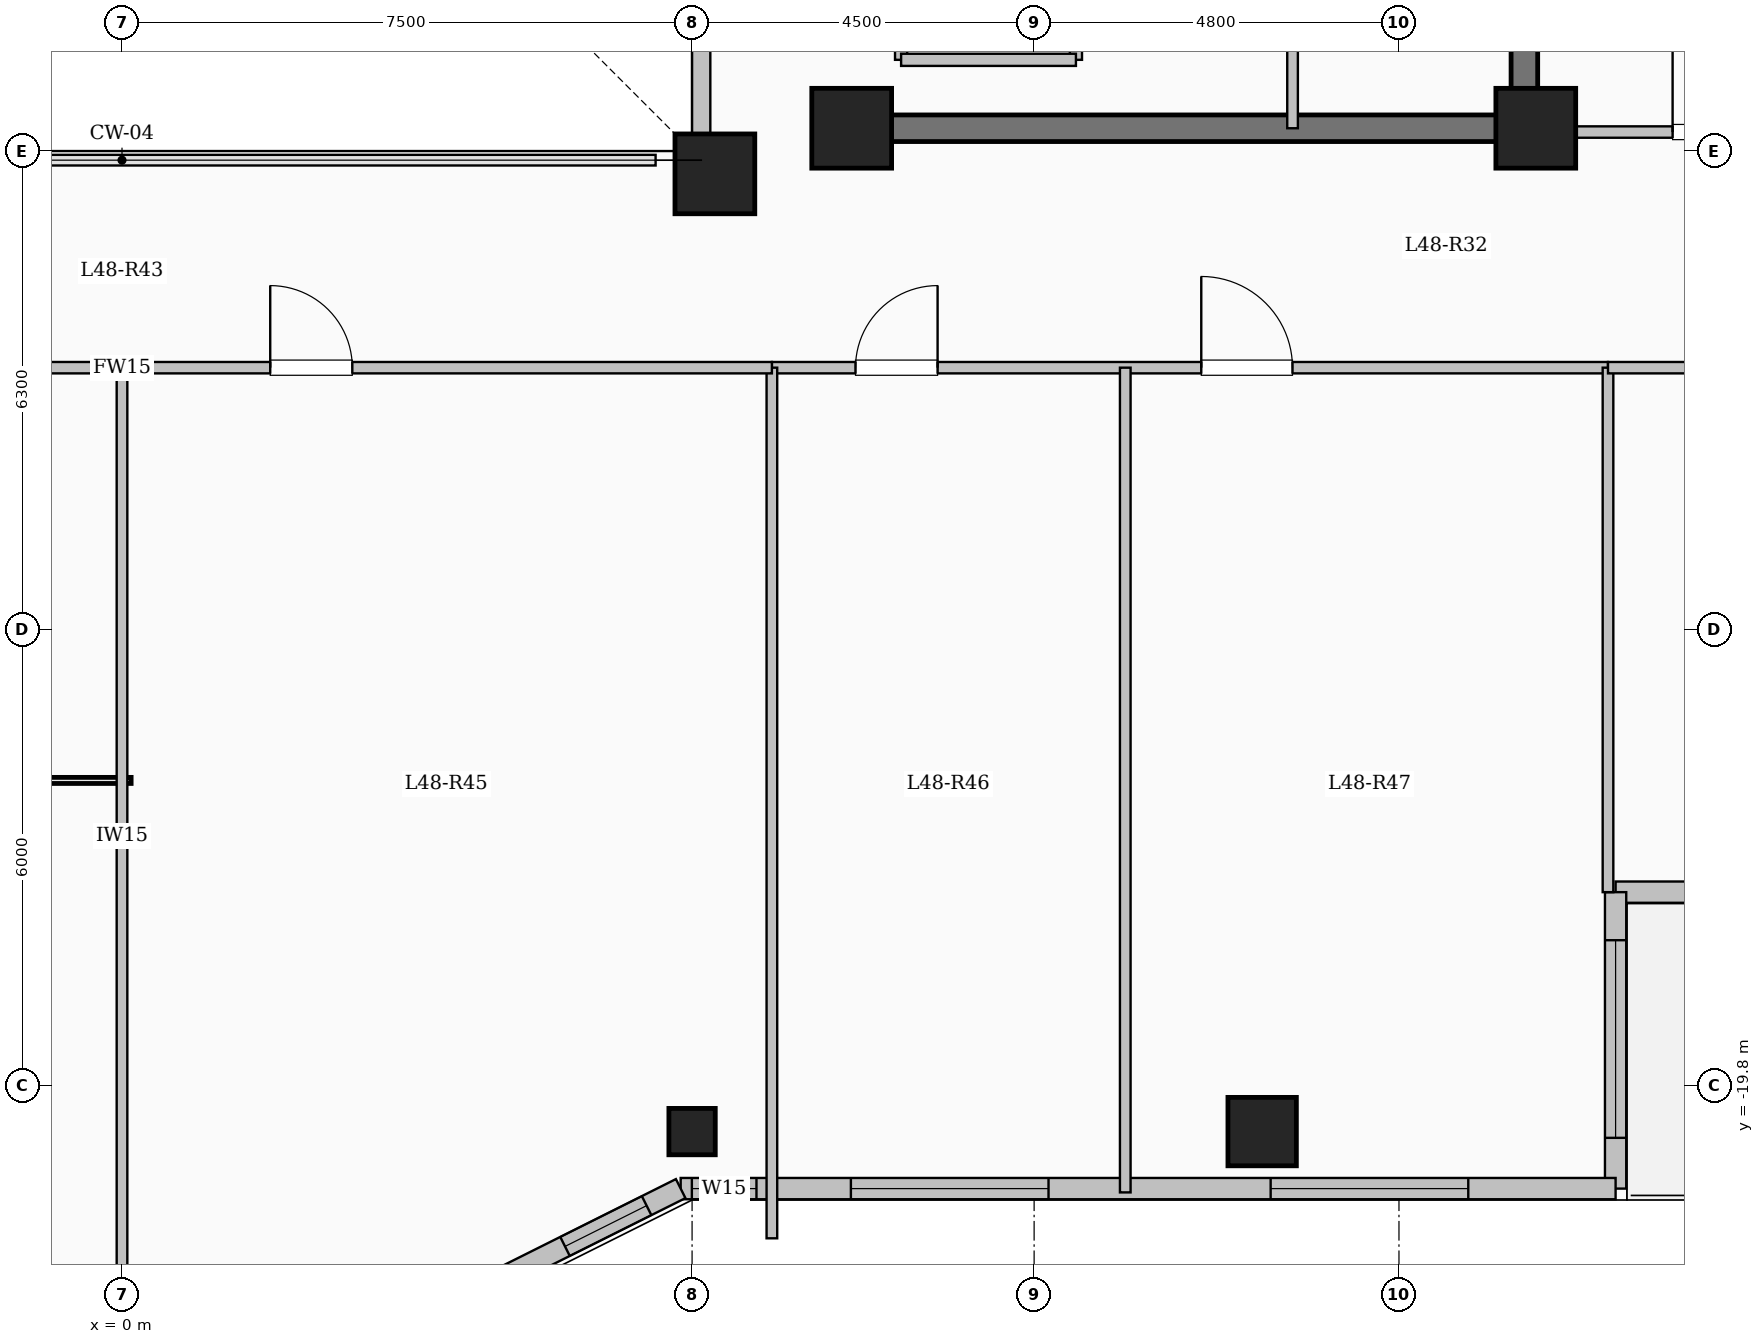
"""IFC4 building model, lengths in metres.
Left out: names, types, materials, properties, quantities, classifications, styles, units other than length and angle.
Written with IfcOpenShell. Run it as: python <this file> out.ifc"""

import sys

from ifc_helpers import new_model, si_unit, direction, frame, frame_2d, origin, origin_2d, place, context, subcontext, project, spatial, rectangle, hollow_circle, extrude, element, fill, save


model = new_model("IFC4")
c1 = context("Model", 3, precision=1e-05, world=origin(), true_north=direction((0.0, 1.0)))
c2 = subcontext(c1, "Body", "Model", "MODEL_VIEW")
j1 = project(units=[si_unit("LENGTHUNIT", "METRE"), si_unit("PLANEANGLEUNIT", "RADIAN")], contexts=[c1])
p1 = place(None, origin())
s1 = spatial("IfcSite", under=j1, at=p1, CompositionType="ELEMENT")
p2 = place(p1, origin())
s2 = spatial("IfcBuilding", under=s1, at=p2, CompositionType="ELEMENT")
p3 = place(p2, frame((0.0, 0.0, 177.3)))
s3 = spatial("IfcBuildingStorey", under=s2, at=p3, CompositionType="ELEMENT", Elevation=177.3)
for number, where, z_axis, x_axis in (
    (1, (7.8, -7.8, 0.0), (0.0, 0.0, 1.0), (1.0, 0.0, 0.0)),
    (2, (9.6, -7.2, 0.0), (0.0, 0.0, 1.0), (1.0, 0.0, 0.0)),
    (3, (18.6, -7.2, 0.0), (0.0, 0.0, 1.0), (1.0, 0.0, 0.0)),
):
    element("IfcColumn", number, at=place(p3, frame(where, z_axis=z_axis, x_axis=x_axis)), inside=s3, PredefinedType="COLUMN", context=c2, shape_type="SweptSolid", body=[
        extrude(rectangle(XDim=1.05, YDim=1.05, at=origin_2d()), origin(), (0.0, 0.0, 1.0), 4.5),
    ])
p4 = place(p3, frame((7.5, -20.4, 0.0), z_axis=(0.0, 0.0, 1.0), x_axis=(1.0, 0.0, 0.0)))
e4 = element("IfcColumn", 4, at=p4, inside=s3, PredefinedType="COLUMN", context=c2, shape_type="SweptSolid", body=[
    extrude(hollow_circle(Radius=0.305, WallThickness=0.025, at=origin_2d()), origin(), (0.0, 0.0, 1.0), 4.5),
])
p5 = place(p3, frame((15.0, -20.4, 0.0), z_axis=(0.0, 0.0, 1.0), x_axis=(1.0, 0.0, 0.0)))
e5 = element("IfcColumn", 5, at=p5, inside=s3, PredefinedType="COLUMN", context=c2, shape_type="SweptSolid", body=[
    extrude(rectangle(XDim=0.9, YDim=0.9, at=origin_2d()), origin(), (0.0, 0.0, 1.0), 4.5),
])
p6 = place(p3, frame((7.62, -7.62, 0.0), z_axis=(0.0, 0.0, 1.0), x_axis=(0.0, 1.0, 0.0)))
e6 = element("IfcWall", 6, at=p6, inside=s3, PredefinedType="SOLIDWALL", context=c2, shape_type="SweptSolid", body=[
    extrude(rectangle(XDim=15.24, YDim=0.24, at=frame_2d((7.62, 0.0))), origin(), (0.0, 0.0, 1.0), 4.2),
])
p7 = place(p6, frame((6.92, 0.0, 0.95)))
e7 = element("IfcOpeningElement", 7, at=p7, cuts=e6, PredefinedType="OPENING", context=c2, shape_type="SweptSolid", body=[
    extrude(rectangle(XDim=1.4, YDim=1.5, at=frame_2d((0.7, 0.75))), frame((0.0, 0.13, 0.0), z_axis=(0.0, -1.0, 0.0), x_axis=(1.0, 0.0, 0.0)), (0.0, 0.0, 1.0), 0.26),
])
p8 = place(p3, frame((25.05, -17.25, 0.0), z_axis=(0.0, 0.0, 1.0), x_axis=(-1.0, 0.0, 0.0)))
e8 = element("IfcWall", 8, at=p8, inside=s3, PredefinedType="SOLIDWALL", context=c2, shape_type="SweptSolid", body=[
    extrude(rectangle(XDim=5.4, YDim=0.28, at=frame_2d((2.7, 0.0))), origin(), (0.0, 0.0, 1.0), 4.2),
])
p9 = place(p8, frame((2.25, 0.0, 0.0)))
e9 = element("IfcOpeningElement", 9, at=p9, cuts=e8, PredefinedType="OPENING", context=c2, shape_type="SweptSolid", body=[
    extrude(rectangle(XDim=1.1, YDim=2.2, at=frame_2d((0.55, 1.1))), frame((0.0, 0.15, 0.0), z_axis=(0.0, -1.0, 0.0), x_axis=(1.0, 0.0, 0.0)), (0.0, 0.0, 1.0), 0.3),
])
p10 = place(p8, frame((0.63, 0.0, 0.95)))
e10 = element("IfcOpeningElement", 10, at=p10, cuts=e8, PredefinedType="OPENING", context=c2, shape_type="SweptSolid", body=[
    extrude(rectangle(XDim=1.2, YDim=1.5, at=frame_2d((0.6, 0.75))), frame((0.0, 0.15, 0.0), z_axis=(0.0, -1.0, 0.0), x_axis=(1.0, 0.0, 0.0)), (0.0, 0.0, 1.0), 0.3),
])
p11 = place(p3, frame((19.65, -17.25, 0.0), z_axis=(0.0, 0.0, 1.0), x_axis=(0.0, -1.0, 0.0)))
e11 = element("IfcWall", 11, at=p11, inside=s3, PredefinedType="SOLIDWALL", context=c2, shape_type="SweptSolid", body=[
    extrude(rectangle(XDim=3.9, YDim=0.28, at=frame_2d((1.95, 0.0))), origin(), (0.0, 0.0, 1.0), 4.2),
])
p12 = place(p11, frame((0.632, 0.0, 0.85)))
e12 = element("IfcOpeningElement", 12, at=p12, cuts=e11, PredefinedType="OPENING", context=c2, shape_type="SweptSolid", body=[
    extrude(rectangle(XDim=2.6, YDim=2.4, at=frame_2d((1.3, 1.2))), frame((0.0, 0.15, 0.0), z_axis=(0.0, -1.0, 0.0), x_axis=(1.0, 0.0, 0.0)), (0.0, 0.0, 1.0), 0.3),
])
p13 = place(p3, frame((19.65, -21.15, 0.0), z_axis=(0.0, 0.0, 1.0), x_axis=(-1.0, 0.0, 0.0)))
e13 = element("IfcWall", 13, at=p13, inside=s3, PredefinedType="SOLIDWALL", context=c2, shape_type="SweptSolid", body=[
    extrude(rectangle(XDim=12.3, YDim=0.28, at=frame_2d((6.15, 0.0))), origin(), (0.0, 0.0, 1.0), 4.2),
])
p14 = place(p13, frame((1.938, 0.0, 0.85)))
e14 = element("IfcOpeningElement", 14, at=p14, cuts=e13, PredefinedType="OPENING", context=c2, shape_type="SweptSolid", body=[
    extrude(rectangle(XDim=2.6, YDim=2.4, at=frame_2d((1.3, 1.2))), frame((0.0, 0.15, 0.0), z_axis=(0.0, -1.0, 0.0), x_axis=(1.0, 0.0, 0.0)), (0.0, 0.0, 1.0), 0.3),
])
p15 = place(p13, frame((7.461, 0.0, 0.85)))
e15 = element("IfcOpeningElement", 15, at=p15, cuts=e13, PredefinedType="OPENING", context=c2, shape_type="SweptSolid", body=[
    extrude(rectangle(XDim=2.6, YDim=2.4, at=frame_2d((1.3, 1.2))), frame((0.0, 0.15, 0.0), z_axis=(0.0, -1.0, 0.0), x_axis=(1.0, 0.0, 0.0)), (0.0, 0.0, 1.0), 0.3),
])
p16 = place(p13, frame((11.303, 0.0, 0.95)))
e16 = element("IfcOpeningElement", 16, at=p16, cuts=e13, PredefinedType="OPENING", context=c2, shape_type="SweptSolid", body=[
    extrude(rectangle(XDim=0.85, YDim=1.5, at=frame_2d((0.425, 0.75))), frame((0.0, 0.15, 0.0), z_axis=(0.0, -1.0, 0.0), x_axis=(1.0, 0.0, 0.0)), (0.0, 0.0, 1.0), 0.3),
])
p17 = place(p3, frame((7.35, -21.15, 0.0), z_axis=(0.0, 0.0, 1.0), x_axis=(-0.894427191, -0.4472135955, 0.0)))
e17 = element("IfcWall", 17, at=p17, inside=s3, PredefinedType="SOLIDWALL", context=c2, shape_type="SweptSolid", body=[
    extrude(rectangle(XDim=3.354, YDim=0.28, at=frame_2d((1.677, 0.0))), origin(), (0.0, 0.0, 1.0), 4.2),
])
p18 = place(p17, frame((0.501, 0.0, 0.95)))
e18 = element("IfcOpeningElement", 18, at=p18, cuts=e17, PredefinedType="OPENING", context=c2, shape_type="SweptSolid", body=[
    extrude(rectangle(XDim=1.2, YDim=1.5, at=frame_2d((0.6, 0.75))), frame((0.0, 0.15, 0.0), z_axis=(0.0, -1.0, 0.0), x_axis=(1.0, 0.0, 0.0)), (0.0, 0.0, 1.0), 0.3),
])
p19 = place(p3, frame((10.25, -6.3, 0.0), z_axis=(0.0, 0.0, 1.0), x_axis=(0.0, 1.0, 0.0)))
e19 = element("IfcWall", 19, at=p19, inside=s3, PredefinedType="SOLIDWALL", context=c2, shape_type="SweptSolid", body=[
    extrude(rectangle(XDim=2.6, YDim=0.16, at=frame_2d((1.3, 0.0))), origin(), (0.0, 0.0, 1.0), 4.2),
])
p20 = place(p19, frame((0.75, 0.0, 0.0)))
e20 = element("IfcOpeningElement", 20, at=p20, cuts=e19, PredefinedType="OPENING", context=c2, shape_type="SweptSolid", body=[
    extrude(rectangle(XDim=1.1, YDim=2.15, at=frame_2d((0.55, 1.075))), frame((0.0, 0.09, 0.0), z_axis=(0.0, -1.0, 0.0), x_axis=(1.0, 0.0, 0.0)), (0.0, 0.0, 1.0), 0.18),
])
p21 = place(p3, frame((12.55, -6.3, 0.0), z_axis=(0.0, 0.0, 1.0), x_axis=(0.0, 1.0, 0.0)))
e21 = element("IfcWall", 21, at=p21, inside=s3, PredefinedType="SOLIDWALL", context=c2, shape_type="SweptSolid", body=[
    extrude(rectangle(XDim=2.6, YDim=0.16, at=frame_2d((1.3, 0.0))), origin(), (0.0, 0.0, 1.0), 4.2),
])
p22 = place(p3, frame((10.25, -6.3, 0.0), z_axis=(0.0, 0.0, 1.0), x_axis=(1.0, 0.0, 0.0)))
e22 = element("IfcWall", 22, at=p22, inside=s3, PredefinedType="SOLIDWALL", context=c2, shape_type="SweptSolid", body=[
    extrude(rectangle(XDim=2.3, YDim=0.16, at=frame_2d((1.15, 0.0))), origin(), (0.0, 0.0, 1.0), 4.2),
])
p23 = place(p3, frame((18.45, -7.375, 0.0), z_axis=(0.0, 0.0, 1.0), x_axis=(0.0, 1.0, 0.0)))
e23 = element("IfcWall", 23, at=p23, inside=s3, PredefinedType="SHEAR", context=c2, shape_type="SweptSolid", body=[
    extrude(rectangle(XDim=14.05, YDim=0.35, at=frame_2d((7.025, 0.0))), origin(), (0.0, 0.0, 1.0), 4.5),
])
p24 = place(p3, frame((10.075, -7.2, 0.0), z_axis=(0.0, 0.0, 1.0), x_axis=(1.0, 0.0, 0.0)))
e24 = element("IfcWall", 24, at=p24, inside=s3, PredefinedType="SHEAR", context=c2, shape_type="SweptSolid", body=[
    extrude(rectangle(XDim=8.55, YDim=0.35, at=frame_2d((4.275, 0.0))), origin(), (0.0, 0.0, 1.0), 4.5),
])
p25 = place(p3, frame((15.4, -7.2, 0.0), z_axis=(0.0, 0.0, 1.0), x_axis=(0.0, 1.0, 0.0)))
e25 = element("IfcWall", 25, at=p25, inside=s3, PredefinedType="PARTITIONING", context=c2, shape_type="SweptSolid", body=[
    extrude(rectangle(XDim=10.45, YDim=0.14, at=frame_2d((5.225, 0.0))), origin(), (0.0, 0.0, 1.0), 4.2),
])
p26 = place(p25, frame((9.25, 0.0, 0.0)))
e26 = element("IfcOpeningElement", 26, at=p26, cuts=e25, PredefinedType="OPENING", context=c2, shape_type="SweptSolid", body=[
    extrude(rectangle(XDim=0.9, YDim=2.08, at=frame_2d((0.45, 1.04))), frame((0.0, 0.08, 0.0), z_axis=(0.0, -1.0, 0.0), x_axis=(1.0, 0.0, 0.0)), (0.0, 0.0, 1.0), 0.16),
])
p27 = place(p3, frame((8.55, -10.35, 0.0), z_axis=(0.0, 0.0, 1.0), x_axis=(1.0, 0.0, 0.0)))
e27 = element("IfcWall", 27, at=p27, inside=s3, PredefinedType="PARTITIONING", context=c2, shape_type="SweptSolid", body=[
    extrude(rectangle(XDim=11.0, YDim=0.15, at=frame_2d((5.5, 0.0))), origin(), (0.0, 0.0, 1.0), 4.2),
])
p28 = place(p27, frame((1.1, 0.0, 0.0)))
e28 = element("IfcOpeningElement", 28, at=p28, cuts=e27, PredefinedType="OPENING", context=c2, shape_type="SweptSolid", body=[
    extrude(rectangle(XDim=1.08, YDim=2.15, at=frame_2d((0.54, 1.075))), frame((0.0, 0.085, 0.0), z_axis=(0.0, -1.0, 0.0), x_axis=(1.0, 0.0, 0.0)), (0.0, 0.0, 1.0), 0.17),
])
p29 = place(p27, frame((5.649, 0.0, 0.0)))
e29 = element("IfcOpeningElement", 29, at=p29, cuts=e27, PredefinedType="OPENING", context=c2, shape_type="SweptSolid", body=[
    extrude(rectangle(XDim=1.2, YDim=2.15, at=frame_2d((0.6, 1.075))), frame((0.0, 0.085, 0.0), z_axis=(0.0, -1.0, 0.0), x_axis=(1.0, 0.0, 0.0)), (0.0, 0.0, 1.0), 0.17),
])
p30 = place(p3, frame((8.55, -21.804, 0.0), z_axis=(0.0, 0.0, 1.0), x_axis=(0.0, 1.0, 0.0)))
e30 = element("IfcWall", 30, at=p30, inside=s3, PredefinedType="PARTITIONING", context=c2, shape_type="SweptSolid", body=[
    extrude(rectangle(XDim=11.454, YDim=0.14, at=frame_2d((5.727, 0.0))), origin(), (0.0, 0.0, 1.0), 4.2),
])
p31 = place(p3, frame((13.199, -21.2, 0.0), z_axis=(0.0, 0.0, 1.0), x_axis=(0.0, 1.0, 0.0)))
e31 = element("IfcWall", 31, at=p31, inside=s3, PredefinedType="PARTITIONING", context=c2, shape_type="SweptSolid", body=[
    extrude(rectangle(XDim=10.85, YDim=0.14, at=frame_2d((5.425, 0.0))), origin(), (0.0, 0.0, 1.0), 4.2),
])
p32 = place(p3, frame((-8.55, -10.35, 0.0), z_axis=(0.0, 0.0, 1.0), x_axis=(1.0, 0.0, 0.0)))
e32 = element("IfcWall", 32, at=p32, inside=s3, PredefinedType="PARTITIONING", context=c2, shape_type="SweptSolid", body=[
    extrude(rectangle(XDim=17.1, YDim=0.15, at=frame_2d((8.55, 0.0))), origin(), (0.0, 0.0, 1.0), 4.2),
])
p33 = place(p32, frame((1.4, 0.0, 0.0)))
e33 = element("IfcOpeningElement", 33, at=p33, cuts=e32, PredefinedType="OPENING", context=c2, shape_type="SweptSolid", body=[
    extrude(rectangle(XDim=1.08, YDim=2.15, at=frame_2d((0.54, 1.075))), frame((0.0, 0.085, 0.0), z_axis=(0.0, -1.0, 0.0), x_axis=(1.0, 0.0, 0.0)), (0.0, 0.0, 1.0), 0.17),
])
p34 = place(p32, frame((10.5, 0.0, 0.0)))
e34 = element("IfcOpeningElement", 34, at=p34, cuts=e32, PredefinedType="OPENING", context=c2, shape_type="SweptSolid", body=[
    extrude(rectangle(XDim=1.08, YDim=2.15, at=frame_2d((0.54, 1.075))), frame((0.0, 0.085, 0.0), z_axis=(0.0, -1.0, 0.0), x_axis=(1.0, 0.0, 0.0)), (0.0, 0.0, 1.0), 0.17),
])
p35 = place(p3, frame((0.0, -22.68, 0.0), z_axis=(0.0, 0.0, 1.0), x_axis=(0.0, 1.0, 0.0)))
e35 = element("IfcWall", 35, at=p35, inside=s3, PredefinedType="PARTITIONING", context=c2, shape_type="SweptSolid", body=[
    extrude(rectangle(XDim=12.33, YDim=0.14, at=frame_2d((6.165, 0.0))), origin(), (0.0, 0.0, 1.0), 4.2),
])
p36 = place(p3, frame((18.45, -7.25, 0.0), z_axis=(0.0, 0.0, 1.0), x_axis=(1.0, 0.0, 0.0)))
e36 = element("IfcWall", 36, at=p36, inside=s3, PredefinedType="PARTITIONING", context=c2, shape_type="SweptSolid", body=[
    extrude(rectangle(XDim=6.63, YDim=0.15, at=frame_2d((3.315, 0.0))), origin(), (0.0, 0.0, 1.0), 4.2),
])
p37 = place(p36, frame((1.95, 0.0, 0.0)))
e37 = element("IfcOpeningElement", 37, at=p37, cuts=e36, PredefinedType="OPENING", context=c2, shape_type="SweptSolid", body=[
    extrude(rectangle(XDim=1.08, YDim=2.15, at=frame_2d((0.54, 1.075))), frame((0.0, 0.085, 0.0), z_axis=(0.0, -1.0, 0.0), x_axis=(1.0, 0.0, 0.0)), (0.0, 0.0, 1.0), 0.17),
])
p38 = place(p3, frame((19.55, -17.25, 0.0), z_axis=(0.0, 0.0, 1.0), x_axis=(0.0, 1.0, 0.0)))
e38 = element("IfcWall", 38, at=p38, inside=s3, PredefinedType="PARTITIONING", context=c2, shape_type="SweptSolid", body=[
    extrude(rectangle(XDim=6.9, YDim=0.14, at=frame_2d((3.45, 0.0))), origin(), (0.0, 0.0, 1.0), 4.2),
])
p39 = place(p3, frame((19.55, -10.35, 0.0), z_axis=(0.0, 0.0, 1.0), x_axis=(1.0, 0.0, 0.0)))
e39 = element("IfcWall", 39, at=p39, inside=s3, PredefinedType="PARTITIONING", context=c2, shape_type="SweptSolid", body=[
    extrude(rectangle(XDim=5.53, YDim=0.15, at=frame_2d((2.765, 0.0))), origin(), (0.0, 0.0, 1.0), 4.2),
])
p40 = place(p39, frame((2.29, 0.0, 0.0)))
e40 = element("IfcOpeningElement", 40, at=p40, cuts=e39, PredefinedType="OPENING", context=c2, shape_type="SweptSolid", body=[
    extrude(rectangle(XDim=0.95, YDim=2.15, at=frame_2d((0.475, 1.075))), frame((0.0, 0.085, 0.0), z_axis=(0.0, -1.0, 0.0), x_axis=(1.0, 0.0, 0.0)), (0.0, 0.0, 1.0), 0.17),
])
p41 = place(p12, origin())
e41 = element("IfcWindow", 41, at=p41, inside=s3, PartitioningType="SINGLE_PANEL", PredefinedType="WINDOW", context=c2, shape_type="SweptSolid", body=[
    extrude(rectangle(XDim=2.6, YDim=2.4, at=frame_2d((1.3, 1.2))), frame((0.0, 0.03, 0.0), z_axis=(0.0, -1.0, 0.0), x_axis=(1.0, 0.0, 0.0)), (0.0, 0.0, 1.0), 0.06),
])
fill(e12, e41)
p42 = place(p14, origin())
e42 = element("IfcWindow", 42, at=p42, inside=s3, PartitioningType="SINGLE_PANEL", PredefinedType="WINDOW", context=c2, shape_type="SweptSolid", body=[
    extrude(rectangle(XDim=2.6, YDim=2.4, at=frame_2d((1.3, 1.2))), frame((0.0, 0.03, 0.0), z_axis=(0.0, -1.0, 0.0), x_axis=(1.0, 0.0, 0.0)), (0.0, 0.0, 1.0), 0.06),
])
fill(e14, e42)
p43 = place(p15, origin())
e43 = element("IfcWindow", 43, at=p43, inside=s3, PartitioningType="SINGLE_PANEL", PredefinedType="WINDOW", context=c2, shape_type="SweptSolid", body=[
    extrude(rectangle(XDim=2.6, YDim=2.4, at=frame_2d((1.3, 1.2))), frame((0.0, 0.03, 0.0), z_axis=(0.0, -1.0, 0.0), x_axis=(1.0, 0.0, 0.0)), (0.0, 0.0, 1.0), 0.06),
])
fill(e15, e43)
p44 = place(p16, origin())
e44 = element("IfcWindow", 44, at=p44, inside=s3, PartitioningType="SINGLE_PANEL", PredefinedType="WINDOW", context=c2, shape_type="SweptSolid", body=[
    extrude(rectangle(XDim=0.85, YDim=1.5, at=frame_2d((0.425, 0.75))), frame((0.0, 0.03, 0.0), z_axis=(0.0, -1.0, 0.0), x_axis=(1.0, 0.0, 0.0)), (0.0, 0.0, 1.0), 0.06),
])
fill(e16, e44)
p45 = place(p18, origin())
e45 = element("IfcWindow", 45, at=p45, inside=s3, PartitioningType="SINGLE_PANEL", PredefinedType="WINDOW", context=c2, shape_type="SweptSolid", body=[
    extrude(rectangle(XDim=1.2, YDim=1.5, at=frame_2d((0.6, 0.75))), frame((0.0, 0.03, 0.0), z_axis=(0.0, -1.0, 0.0), x_axis=(1.0, 0.0, 0.0)), (0.0, 0.0, 1.0), 0.06),
])
fill(e18, e45)
p46 = place(p34, origin())
e46 = element("IfcDoor", 46, at=p46, inside=s3, OperationType="SINGLE_SWING_LEFT", PredefinedType="DOOR", context=c2, shape_type="SweptSolid", body=[
    extrude(rectangle(XDim=1.08, YDim=2.15, at=frame_2d((0.54, 1.075))), frame((0.0, 0.025, 0.0), z_axis=(0.0, -1.0, 0.0), x_axis=(1.0, 0.0, 0.0)), (0.0, 0.0, 1.0), 0.05),
])
fill(e34, e46)
p47 = place(p28, origin())
e47 = element("IfcDoor", 47, at=p47, inside=s3, OperationType="SINGLE_SWING_RIGHT", PredefinedType="DOOR", context=c2, shape_type="SweptSolid", body=[
    extrude(rectangle(XDim=1.08, YDim=2.15, at=frame_2d((0.54, 1.075))), frame((0.0, 0.025, 0.0), z_axis=(0.0, -1.0, 0.0), x_axis=(1.0, 0.0, 0.0)), (0.0, 0.0, 1.0), 0.05),
])
fill(e28, e47)
p48 = place(p29, origin())
e48 = element("IfcDoor", 48, at=p48, inside=s3, OperationType="SINGLE_SWING_LEFT", PredefinedType="DOOR", context=c2, shape_type="SweptSolid", body=[
    extrude(rectangle(XDim=1.2, YDim=2.15, at=frame_2d((0.6, 1.075))), frame((0.0, 0.025, 0.0), z_axis=(0.0, -1.0, 0.0), x_axis=(1.0, 0.0, 0.0)), (0.0, 0.0, 1.0), 0.05),
])
fill(e29, e48)
p49 = place(p37, origin())
e49 = element("IfcDoor", 49, at=p49, inside=s3, OperationType="SINGLE_SWING_LEFT", PredefinedType="DOOR", context=c2, shape_type="SweptSolid", body=[
    extrude(rectangle(XDim=1.08, YDim=2.15, at=frame_2d((0.54, 1.075))), frame((0.0, 0.025, 0.0), z_axis=(0.0, -1.0, 0.0), x_axis=(1.0, 0.0, 0.0)), (0.0, 0.0, 1.0), 0.05),
])
fill(e37, e49)
save(model, sys.argv[1])
